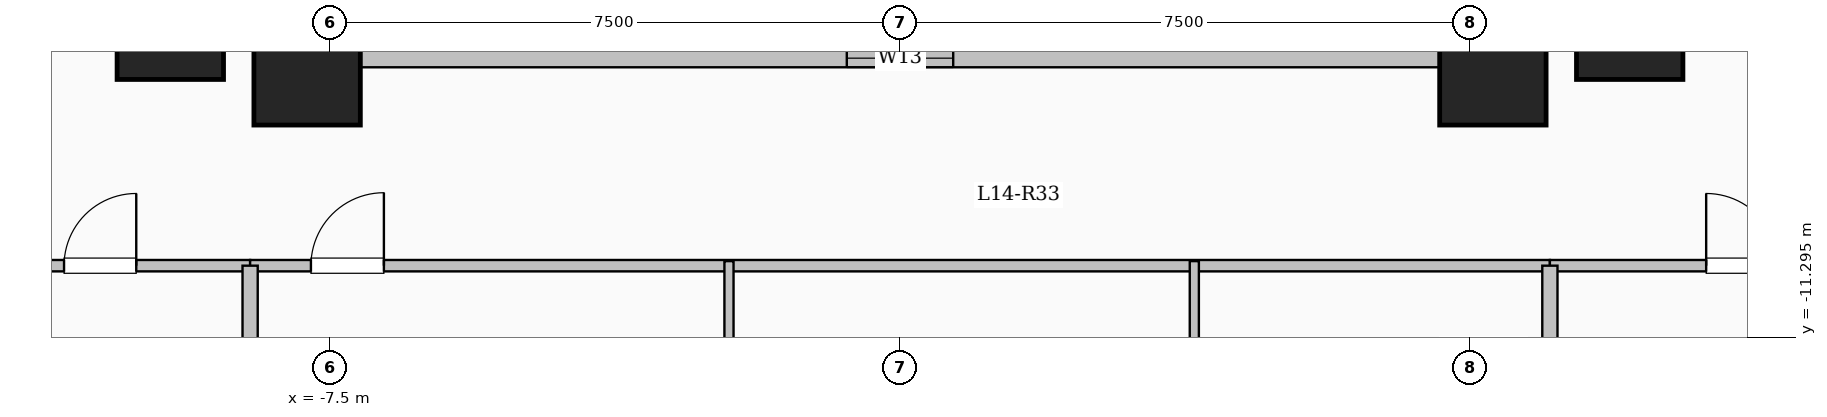
"""IFC4 building model, lengths in metres.
Left out: names, types, materials, properties, quantities, classifications, styles, units other than length and angle.
Written with IfcOpenShell. Run it as: python <this file> out.ifc"""

import sys

from ifc_helpers import new_model, si_unit, direction, frame, frame_2d, origin, origin_2d, place, context, subcontext, project, spatial, rectangle, extrude, element, fill, save


model = new_model("IFC4")
c1 = context("Model", 3, precision=1e-05, world=origin(), true_north=direction((0.0, 1.0)))
c2 = subcontext(c1, "Body", "Model", "MODEL_VIEW")
j1 = project(units=[si_unit("LENGTHUNIT", "METRE"), si_unit("PLANEANGLEUNIT", "RADIAN")], contexts=[c1])
p1 = place(None, origin())
s1 = spatial("IfcSite", under=j1, at=p1, CompositionType="ELEMENT")
p2 = place(p1, origin())
s2 = spatial("IfcBuilding", under=s1, at=p2, CompositionType="ELEMENT")
p3 = place(p2, frame((0.0, 0.0, 54.15)))
s3 = spatial("IfcBuildingStorey", under=s2, at=p3, CompositionType="ELEMENT", Elevation=54.15)
for number, where, z_axis, x_axis in (
    (1, (-7.8, -7.8, 0.0), (0.0, 0.0, 1.0), (1.0, 0.0, 0.0)),
    (2, (7.8, -7.8, 0.0), (0.0, 0.0, 1.0), (1.0, 0.0, 0.0)),
    (3, (-9.6, -7.2, 0.0), (0.0, 0.0, 1.0), (1.0, 0.0, 0.0)),
    (4, (9.6, -7.2, 0.0), (0.0, 0.0, 1.0), (1.0, 0.0, 0.0)),
):
    element("IfcColumn", number, at=place(p3, frame(where, z_axis=z_axis, x_axis=x_axis)), inside=s3, PredefinedType="COLUMN", context=c2, shape_type="SweptSolid", body=[
        extrude(rectangle(XDim=1.4, YDim=1.4, at=origin_2d()), origin(), (0.0, 0.0, 1.0), 3.35),
    ])
p4 = place(p3, frame((-7.62, -7.62, 0.0), z_axis=(0.0, 0.0, 1.0), x_axis=(1.0, 0.0, 0.0)))
e5 = element("IfcWall", 5, at=p4, inside=s3, PredefinedType="SOLIDWALL", context=c2, shape_type="SweptSolid", body=[
    extrude(rectangle(XDim=15.24, YDim=0.24, at=frame_2d((7.62, 0.0))), origin(), (0.0, 0.0, 1.0), 3.1),
])
p5 = place(p4, frame((6.92, 0.0, 0.95)))
e6 = element("IfcOpeningElement", 6, at=p5, cuts=e5, PredefinedType="OPENING", context=c2, shape_type="SweptSolid", body=[
    extrude(rectangle(XDim=1.4, YDim=1.5, at=frame_2d((0.7, 0.75))), frame((0.0, 0.13, 0.0), z_axis=(0.0, -1.0, 0.0), x_axis=(1.0, 0.0, 0.0)), (0.0, 0.0, 1.0), 0.26),
])
p6 = place(p3, frame((7.62, -7.62, 0.0), z_axis=(0.0, 0.0, 1.0), x_axis=(0.0, 1.0, 0.0)))
e7 = element("IfcWall", 7, at=p6, inside=s3, PredefinedType="SOLIDWALL", context=c2, shape_type="SweptSolid", body=[
    extrude(rectangle(XDim=15.24, YDim=0.24, at=frame_2d((7.62, 0.0))), origin(), (0.0, 0.0, 1.0), 3.1),
])
p7 = place(p6, frame((6.92, 0.0, 0.95)))
e8 = element("IfcOpeningElement", 8, at=p7, cuts=e7, PredefinedType="OPENING", context=c2, shape_type="SweptSolid", body=[
    extrude(rectangle(XDim=1.4, YDim=1.5, at=frame_2d((0.7, 0.75))), frame((0.0, 0.13, 0.0), z_axis=(0.0, -1.0, 0.0), x_axis=(1.0, 0.0, 0.0)), (0.0, 0.0, 1.0), 0.26),
])
p8 = place(p3, frame((-7.62, 7.62, 0.0), z_axis=(0.0, 0.0, 1.0), x_axis=(0.0, -1.0, 0.0)))
e9 = element("IfcWall", 9, at=p8, inside=s3, PredefinedType="SOLIDWALL", context=c2, shape_type="SweptSolid", body=[
    extrude(rectangle(XDim=15.24, YDim=0.24, at=frame_2d((7.62, 0.0))), origin(), (0.0, 0.0, 1.0), 3.1),
])
p9 = place(p8, frame((6.92, 0.0, 0.95)))
e10 = element("IfcOpeningElement", 10, at=p9, cuts=e9, PredefinedType="OPENING", context=c2, shape_type="SweptSolid", body=[
    extrude(rectangle(XDim=1.4, YDim=1.5, at=frame_2d((0.7, 0.75))), frame((0.0, 0.13, 0.0), z_axis=(0.0, -1.0, 0.0), x_axis=(1.0, 0.0, 0.0)), (0.0, 0.0, 1.0), 0.26),
])
p10 = place(p3, frame((-22.55, -10.35, 0.0), z_axis=(0.0, 0.0, 1.0), x_axis=(1.0, 0.0, 0.0)))
e11 = element("IfcWall", 11, at=p10, inside=s3, PredefinedType="PARTITIONING", context=c2, shape_type="SweptSolid", body=[
    extrude(rectangle(XDim=14.0, YDim=0.15, at=frame_2d((7.0, 0.0))), origin(), (0.0, 0.0, 1.0), 3.1),
])
p11 = place(p10, frame((2.006, 0.0, 0.0)))
e12 = element("IfcOpeningElement", 12, at=p11, cuts=e11, PredefinedType="OPENING", context=c2, shape_type="SweptSolid", body=[
    extrude(rectangle(XDim=0.95, YDim=2.15, at=frame_2d((0.475, 1.075))), frame((0.0, 0.085, 0.0), z_axis=(0.0, -1.0, 0.0), x_axis=(1.0, 0.0, 0.0)), (0.0, 0.0, 1.0), 0.17),
])
p12 = place(p10, frame((7.058, 0.0, 0.0)))
e13 = element("IfcOpeningElement", 13, at=p12, cuts=e11, PredefinedType="OPENING", context=c2, shape_type="SweptSolid", body=[
    extrude(rectangle(XDim=0.95, YDim=2.15, at=frame_2d((0.475, 1.075))), frame((0.0, 0.085, 0.0), z_axis=(0.0, -1.0, 0.0), x_axis=(1.0, 0.0, 0.0)), (0.0, 0.0, 1.0), 0.17),
])
p13 = place(p10, frame((11.552, 0.0, 0.0)))
e14 = element("IfcOpeningElement", 14, at=p13, cuts=e11, PredefinedType="OPENING", context=c2, shape_type="SweptSolid", body=[
    extrude(rectangle(XDim=0.95, YDim=2.15, at=frame_2d((0.475, 1.075))), frame((0.0, 0.085, 0.0), z_axis=(0.0, -1.0, 0.0), x_axis=(1.0, 0.0, 0.0)), (0.0, 0.0, 1.0), 0.17),
])
p14 = place(p3, frame((-8.55, -10.35, 0.0), z_axis=(0.0, 0.0, 1.0), x_axis=(1.0, 0.0, 0.0)))
e15 = element("IfcWall", 15, at=p14, inside=s3, PredefinedType="PARTITIONING", context=c2, shape_type="SweptSolid", body=[
    extrude(rectangle(XDim=17.1, YDim=0.15, at=frame_2d((8.55, 0.0))), origin(), (0.0, 0.0, 1.0), 3.1),
])
p15 = place(p14, frame((0.8, 0.0, 0.0)))
e16 = element("IfcOpeningElement", 16, at=p15, cuts=e15, PredefinedType="OPENING", context=c2, shape_type="SweptSolid", body=[
    extrude(rectangle(XDim=0.96, YDim=2.15, at=frame_2d((0.48, 1.075))), frame((0.0, 0.085, 0.0), z_axis=(0.0, -1.0, 0.0), x_axis=(1.0, 0.0, 0.0)), (0.0, 0.0, 1.0), 0.17),
])
p16 = place(p3, frame((8.55, -10.35, 0.0), z_axis=(0.0, 0.0, 1.0), x_axis=(1.0, 0.0, 0.0)))
e17 = element("IfcWall", 17, at=p16, inside=s3, PredefinedType="PARTITIONING", context=c2, shape_type="SweptSolid", body=[
    extrude(rectangle(XDim=14.0, YDim=0.15, at=frame_2d((7.0, 0.0))), origin(), (0.0, 0.0, 1.0), 3.1),
])
p17 = place(p16, frame((2.056, 0.0, 0.0)))
e18 = element("IfcOpeningElement", 18, at=p17, cuts=e17, PredefinedType="OPENING", context=c2, shape_type="SweptSolid", body=[
    extrude(rectangle(XDim=0.95, YDim=2.15, at=frame_2d((0.475, 1.075))), frame((0.0, 0.085, 0.0), z_axis=(0.0, -1.0, 0.0), x_axis=(1.0, 0.0, 0.0)), (0.0, 0.0, 1.0), 0.17),
])
p18 = place(p16, frame((7.108, 0.0, 0.0)))
e19 = element("IfcOpeningElement", 19, at=p18, cuts=e17, PredefinedType="OPENING", context=c2, shape_type="SweptSolid", body=[
    extrude(rectangle(XDim=0.95, YDim=2.15, at=frame_2d((0.475, 1.075))), frame((0.0, 0.085, 0.0), z_axis=(0.0, -1.0, 0.0), x_axis=(1.0, 0.0, 0.0)), (0.0, 0.0, 1.0), 0.17),
])
p19 = place(p16, frame((11.602, 0.0, 0.0)))
e20 = element("IfcOpeningElement", 20, at=p19, cuts=e17, PredefinedType="OPENING", context=c2, shape_type="SweptSolid", body=[
    extrude(rectangle(XDim=0.95, YDim=2.15, at=frame_2d((0.475, 1.075))), frame((0.0, 0.085, 0.0), z_axis=(0.0, -1.0, 0.0), x_axis=(1.0, 0.0, 0.0)), (0.0, 0.0, 1.0), 0.17),
])
for number, where, z_axis, x_axis in (
    (21, (-8.55, -24.204, 0.0), (0.0, 0.0, 1.0), (0.0, 1.0, 0.0)),
    (22, (8.55, -24.204, 0.0), (0.0, 0.0, 1.0), (0.0, 1.0, 0.0)),
):
    element("IfcWall", number, at=place(p3, frame(where, z_axis=z_axis, x_axis=x_axis)), inside=s3, PredefinedType="SOLIDWALL", context=c2, shape_type="SweptSolid", body=[
        extrude(rectangle(XDim=13.854, YDim=0.2, at=frame_2d((6.927, 0.0))), origin(), (0.0, 0.0, 1.0), 3.1),
    ])
p20 = place(p3, frame((-2.25, -25.08, 0.0), z_axis=(0.0, 0.0, 1.0), x_axis=(0.0, 1.0, 0.0)))
e23 = element("IfcWall", 23, at=p20, inside=s3, PredefinedType="PARTITIONING", context=c2, shape_type="SweptSolid", body=[
    extrude(rectangle(XDim=14.79, YDim=0.12, at=frame_2d((7.395, 0.0))), origin(), (0.0, 0.0, 1.0), 3.1),
])
p21 = place(p20, frame((10.625, 0.0, 0.0)))
e24 = element("IfcOpeningElement", 24, at=p21, cuts=e23, PredefinedType="OPENING", context=c2, shape_type="SweptSolid", body=[
    extrude(rectangle(XDim=1.08, YDim=2.15, at=frame_2d((0.54, 1.075))), frame((0.0, 0.07, 0.0), z_axis=(0.0, -1.0, 0.0), x_axis=(1.0, 0.0, 0.0)), (0.0, 0.0, 1.0), 0.14),
])
p22 = place(p3, frame((3.872, -13.09, 0.0), z_axis=(0.0, 0.0, 1.0), x_axis=(0.0, 1.0, 0.0)))
e25 = element("IfcWall", 25, at=p22, inside=s3, PredefinedType="PARTITIONING", context=c2, shape_type="SweptSolid", body=[
    extrude(rectangle(XDim=2.8, YDim=0.12, at=frame_2d((1.4, 0.0))), origin(), (0.0, 0.0, 1.0), 3.1),
])
p23 = place(p5, origin())
e26 = element("IfcWindow", 26, at=p23, inside=s3, PartitioningType="SINGLE_PANEL", PredefinedType="WINDOW", context=c2, shape_type="SweptSolid", body=[
    extrude(rectangle(XDim=1.4, YDim=1.5, at=frame_2d((0.7, 0.75))), frame((0.0, 0.03, 0.0), z_axis=(0.0, -1.0, 0.0), x_axis=(1.0, 0.0, 0.0)), (0.0, 0.0, 1.0), 0.06),
])
fill(e6, e26)
p24 = place(p13, origin())
e27 = element("IfcDoor", 27, at=p24, inside=s3, OperationType="SINGLE_SWING_RIGHT", PredefinedType="DOOR", context=c2, shape_type="SweptSolid", body=[
    extrude(rectangle(XDim=0.95, YDim=2.15, at=frame_2d((0.475, 1.075))), frame((0.0, 0.025, 0.0), z_axis=(0.0, -1.0, 0.0), x_axis=(1.0, 0.0, 0.0)), (0.0, 0.0, 1.0), 0.05),
])
fill(e14, e27)
p25 = place(p17, origin())
e28 = element("IfcDoor", 28, at=p25, inside=s3, OperationType="SINGLE_SWING_LEFT", PredefinedType="DOOR", context=c2, shape_type="SweptSolid", body=[
    extrude(rectangle(XDim=0.95, YDim=2.15, at=frame_2d((0.475, 1.075))), frame((0.0, 0.025, 0.0), z_axis=(0.0, -1.0, 0.0), x_axis=(1.0, 0.0, 0.0)), (0.0, 0.0, 1.0), 0.05),
])
fill(e18, e28)
p26 = place(p15, origin())
e29 = element("IfcDoor", 29, at=p26, inside=s3, OperationType="SINGLE_SWING_RIGHT", PredefinedType="DOOR", context=c2, shape_type="SweptSolid", body=[
    extrude(rectangle(XDim=0.96, YDim=2.15, at=frame_2d((0.48, 1.075))), frame((0.0, 0.025, 0.0), z_axis=(0.0, -1.0, 0.0), x_axis=(1.0, 0.0, 0.0)), (0.0, 0.0, 1.0), 0.05),
])
fill(e16, e29)
save(model, sys.argv[1])
